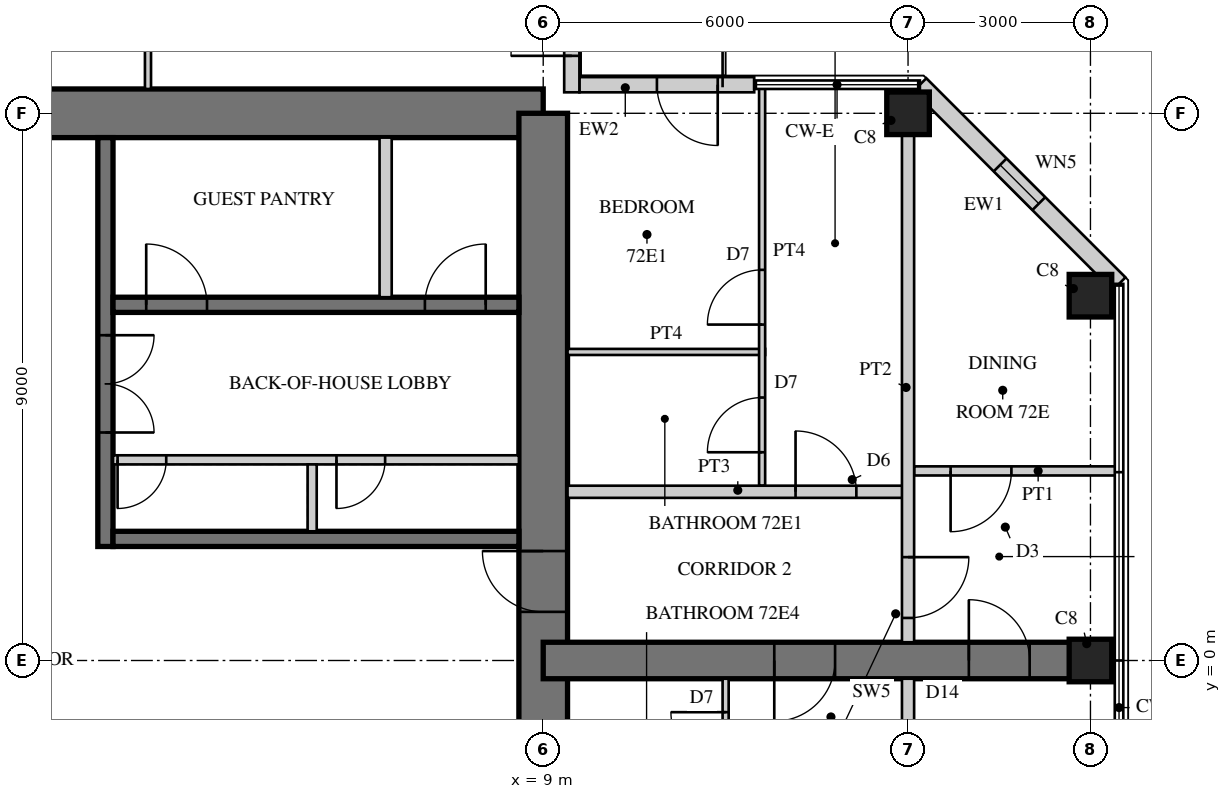
"""IFC4 building model, lengths in metres.
Left out: names, types, materials, properties, quantities, classifications, styles, units other than length and angle.
Written with IfcOpenShell. Run it as: python <this file> out.ifc"""

import sys

from ifc_helpers import new_model, si_unit, direction, frame, frame_2d, origin, origin_2d, place, context, subcontext, project, spatial, rectangle, hollow_rectangle, extrude, element, fill, save


model = new_model("IFC4")
c1 = context("Model", 3, precision=1e-05, world=origin(), true_north=direction((0.0, 1.0)))
c2 = subcontext(c1, "Body", "Model", "MODEL_VIEW")
j1 = project(units=[si_unit("LENGTHUNIT", "METRE"), si_unit("PLANEANGLEUNIT", "RADIAN")], contexts=[c1])
p1 = place(None, origin())
s1 = spatial("IfcSite", under=j1, at=p1, CompositionType="ELEMENT")
p2 = place(p1, origin())
s2 = spatial("IfcBuilding", under=s1, at=p2, CompositionType="ELEMENT")
p3 = place(p2, frame((0.0, 0.0, 278.1)))
s3 = spatial("IfcBuildingStorey", under=s2, at=p3, CompositionType="ELEMENT", Elevation=278.1)
p4 = place(p3, frame((9.0, 9.0, 0.0), z_axis=(0.0, 0.0, 1.0), x_axis=(-1.0, 0.0, 0.0)))
e1 = element("IfcWall", 1, at=p4, inside=s3, PredefinedType="SHEAR", context=c2, shape_type="SweptSolid", body=[
    extrude(rectangle(XDim=18.0, YDim=0.8, at=frame_2d((9.0, 0.0))), origin(), (0.0, 0.0, 1.0), 3.4),
])
p5 = place(p4, frame((9.8, 0.0, 0.0)))
e2 = element("IfcOpeningElement", 2, at=p5, cuts=e1, PredefinedType="OPENING", context=c2, shape_type="SweptSolid", body=[
    extrude(rectangle(XDim=1.0, YDim=2.4, at=frame_2d((0.5, 1.2))), frame((0.0, 0.41, 0.0), z_axis=(0.0, -1.0, 0.0), x_axis=(1.0, 0.0, 0.0)), (0.0, 0.0, 1.0), 0.82),
])
p6 = place(p3, frame((9.0, -9.0, 0.0), z_axis=(0.0, 0.0, 1.0), x_axis=(0.0, 1.0, 0.0)))
e3 = element("IfcWall", 3, at=p6, inside=s3, PredefinedType="SHEAR", context=c2, shape_type="SweptSolid", body=[
    extrude(rectangle(XDim=18.0, YDim=0.8, at=frame_2d((9.0, 0.0))), origin(), (0.0, 0.0, 1.0), 3.4),
])
p7 = place(p6, frame((9.8, 0.0, 0.0)))
e4 = element("IfcOpeningElement", 4, at=p7, cuts=e3, PredefinedType="OPENING", context=c2, shape_type="SweptSolid", body=[
    extrude(rectangle(XDim=1.0, YDim=2.4, at=frame_2d((0.5, 1.2))), frame((0.0, 0.41, 0.0), z_axis=(0.0, -1.0, 0.0), x_axis=(1.0, 0.0, 0.0)), (0.0, 0.0, 1.0), 0.82),
])
p8 = place(p3, frame((1.8, 1.875, 0.0), z_axis=(0.0, 0.0, 1.0), x_axis=(0.0, 1.0, 0.0)))
e5 = element("IfcWall", 5, at=p8, inside=s3, PredefinedType="SHEAR", context=c2, shape_type="SweptSolid", body=[
    extrude(rectangle(XDim=6.725, YDim=0.25, at=frame_2d((3.363, 0.0))), origin(), (0.0, 0.0, 1.0), 3.4),
])
p9 = place(p8, frame((1.875, 0.0, 0.0)))
e6 = element("IfcOpeningElement", 6, at=p9, cuts=e5, PredefinedType="OPENING", context=c2, shape_type="SweptSolid", body=[
    extrude(rectangle(XDim=1.6, YDim=2.4, at=frame_2d((0.8, 1.2))), frame((0.0, 0.135, 0.0), z_axis=(0.0, -1.0, 0.0), x_axis=(1.0, 0.0, 0.0)), (0.0, 0.0, 1.0), 0.27),
])
p10 = place(p3, frame((1.925, 2.0, 0.0), z_axis=(0.0, 0.0, 1.0), x_axis=(1.0, 0.0, 0.0)))
e7 = element("IfcWall", 7, at=p10, inside=s3, PredefinedType="SHEAR", context=c2, shape_type="SweptSolid", body=[
    extrude(rectangle(XDim=6.675, YDim=0.25, at=frame_2d((3.337, 0.0))), origin(), (0.0, 0.0, 1.0), 3.4),
])
p11 = place(p3, frame((1.925, 5.85, 0.0), z_axis=(0.0, 0.0, 1.0), x_axis=(1.0, 0.0, 0.0)))
e8 = element("IfcWall", 8, at=p11, inside=s3, PredefinedType="SHEAR", context=c2, shape_type="SweptSolid", body=[
    extrude(rectangle(XDim=6.675, YDim=0.25, at=frame_2d((3.337, 0.0))), origin(), (0.0, 0.0, 1.0), 3.4),
])
p12 = place(p11, frame((0.546, 0.0, 0.0)))
e9 = element("IfcOpeningElement", 9, at=p12, cuts=e8, PredefinedType="OPENING", context=c2, shape_type="SweptSolid", body=[
    extrude(rectangle(XDim=1.0, YDim=2.1, at=frame_2d((0.5, 1.05))), frame((0.0, 0.135, 0.0), z_axis=(0.0, -1.0, 0.0), x_axis=(1.0, 0.0, 0.0)), (0.0, 0.0, 1.0), 0.27),
])
p13 = place(p11, frame((5.129, 0.0, 0.0)))
e10 = element("IfcOpeningElement", 10, at=p13, cuts=e8, PredefinedType="OPENING", context=c2, shape_type="SweptSolid", body=[
    extrude(rectangle(XDim=1.0, YDim=2.1, at=frame_2d((0.5, 1.05))), frame((0.0, 0.135, 0.0), z_axis=(0.0, -1.0, 0.0), x_axis=(1.0, 0.0, 0.0)), (0.0, 0.0, 1.0), 0.27),
])
p14 = place(p3, frame((1.925, 3.3, 0.0), z_axis=(0.0, 0.0, 1.0), x_axis=(1.0, 0.0, 0.0)))
e11 = element("IfcWall", 11, at=p14, inside=s3, PredefinedType="PARTITIONING", context=c2, shape_type="SweptSolid", body=[
    extrude(rectangle(XDim=6.675, YDim=0.15, at=frame_2d((3.337, 0.0))), origin(), (0.0, 0.0, 1.0), 3.4),
])
p15 = place(p14, frame((0.075, 0.0, 0.0)))
e12 = element("IfcOpeningElement", 12, at=p15, cuts=e11, PredefinedType="OPENING", context=c2, shape_type="SweptSolid", body=[
    extrude(rectangle(XDim=0.8, YDim=2.1, at=frame_2d((0.4, 1.05))), frame((0.0, 0.085, 0.0), z_axis=(0.0, -1.0, 0.0), x_axis=(1.0, 0.0, 0.0)), (0.0, 0.0, 1.0), 0.17),
])
p16 = place(p14, frame((3.675, 0.0, 0.0)))
e13 = element("IfcOpeningElement", 13, at=p16, cuts=e11, PredefinedType="OPENING", context=c2, shape_type="SweptSolid", body=[
    extrude(rectangle(XDim=0.8, YDim=2.1, at=frame_2d((0.4, 1.05))), frame((0.0, 0.085, 0.0), z_axis=(0.0, -1.0, 0.0), x_axis=(1.0, 0.0, 0.0)), (0.0, 0.0, 1.0), 0.17),
])
p17 = place(p3, frame((5.2, 2.125, 0.0), z_axis=(0.0, 0.0, 1.0), x_axis=(0.0, 1.0, 0.0)))
e14 = element("IfcWall", 14, at=p17, inside=s3, PredefinedType="PARTITIONING", context=c2, shape_type="SweptSolid", body=[
    extrude(rectangle(XDim=1.1, YDim=0.15, at=frame_2d((0.55, 0.0))), origin(), (0.0, 0.0, 1.0), 3.4),
])
p18 = place(p3, frame((6.408, 5.975, 0.0), z_axis=(0.0, 0.0, 1.0), x_axis=(0.0, 1.0, 0.0)))
e15 = element("IfcWall", 15, at=p18, inside=s3, PredefinedType="PARTITIONING", context=c2, shape_type="SweptSolid", body=[
    extrude(rectangle(XDim=2.625, YDim=0.2, at=frame_2d((1.312, 0.0))), origin(), (0.0, 0.0, 1.0), 3.4),
])
p19 = place(p3, frame((9.0, 0.0, 0.0), z_axis=(0.0, 0.0, 1.0), x_axis=(1.0, 0.0, 0.0)))
e16 = element("IfcWall", 16, at=p19, inside=s3, PredefinedType="SHEAR", context=c2, shape_type="SweptSolid", body=[
    extrude(rectangle(XDim=9.0, YDim=0.6, at=frame_2d((4.5, 0.0))), origin(), (0.0, 0.0, 1.0), 3.4),
])
p20 = place(p19, frame((3.8, 0.0, 0.0)))
e17 = element("IfcOpeningElement", 17, at=p20, cuts=e16, PredefinedType="OPENING", context=c2, shape_type="SweptSolid", body=[
    extrude(rectangle(XDim=1.0, YDim=2.15, at=frame_2d((0.5, 1.075))), frame((0.0, 0.31, 0.0), z_axis=(0.0, -1.0, 0.0), x_axis=(1.0, 0.0, 0.0)), (0.0, 0.0, 1.0), 0.62),
])
p21 = place(p19, frame((7.0, 0.0, 0.0)))
e18 = element("IfcOpeningElement", 18, at=p21, cuts=e16, PredefinedType="OPENING", context=c2, shape_type="SweptSolid", body=[
    extrude(rectangle(XDim=1.0, YDim=2.2, at=frame_2d((0.5, 1.1))), frame((0.0, 0.31, 0.0), z_axis=(0.0, -1.0, 0.0), x_axis=(1.0, 0.0, 0.0)), (0.0, 0.0, 1.0), 0.62),
])
for number, where, z_axis, x_axis in (
    (19, (15.0, 9.0, 0.0), (0.0, 0.0, 1.0), (1.0, 0.0, 0.0)),
    (20, (18.0, 0.0, 0.0), (0.0, 0.0, 1.0), (1.0, 0.0, 0.0)),
    (21, (18.0, 6.0, 0.0), (0.0, 0.0, 1.0), (1.0, 0.0, 0.0)),
):
    element("IfcColumn", number, at=place(p3, frame(where, z_axis=z_axis, x_axis=x_axis)), inside=s3, PredefinedType="COLUMN", context=c2, shape_type="SweptSolid", body=[
        extrude(rectangle(XDim=0.7, YDim=0.7, at=origin_2d()), origin(), (0.0, 0.0, 1.0), 3.4),
    ])
p22 = place(p3, frame((18.47, 6.195, 0.0), z_axis=(0.0, 0.0, 1.0), x_axis=(-0.707106781187, 0.707106781187, 0.0)))
e22 = element("IfcWall", 22, at=p22, inside=s3, PredefinedType="SOLIDWALL", context=c2, shape_type="SweptSolid", body=[
    extrude(rectangle(XDim=4.632, YDim=0.3, at=frame_2d((2.316, 0.0))), origin(), (0.0, 0.0, 1.0), 3.22),
])
p23 = place(p22, frame((1.866, 0.0, 0.3)))
e23 = element("IfcOpeningElement", 23, at=p23, cuts=e22, PredefinedType="OPENING", context=c2, shape_type="SweptSolid", body=[
    extrude(rectangle(XDim=0.9, YDim=2.4, at=frame_2d((0.45, 1.2))), frame((0.0, 0.16, 0.0), z_axis=(0.0, -1.0, 0.0), x_axis=(1.0, 0.0, 0.0)), (0.0, 0.0, 1.0), 0.32),
])
p24 = place(p3, frame((12.47, 9.47, 0.0), z_axis=(0.0, 0.0, 1.0), x_axis=(-1.0, 0.0, 0.0)))
e24 = element("IfcWall", 24, at=p24, inside=s3, PredefinedType="SOLIDWALL", context=c2, shape_type="SweptSolid", body=[
    extrude(rectangle(XDim=2.875, YDim=0.25, at=frame_2d((1.438, 0.0))), origin(), (0.0, 0.0, 1.0), 3.22),
])
p25 = place(p24, frame((0.6, 0.0, 0.0)))
e25 = element("IfcOpeningElement", 25, at=p25, cuts=e24, PredefinedType="OPENING", context=c2, shape_type="SweptSolid", body=[
    extrude(rectangle(XDim=1.0, YDim=2.2, at=frame_2d((0.5, 1.1))), frame((0.0, 0.135, 0.0), z_axis=(0.0, -1.0, 0.0), x_axis=(1.0, 0.0, 0.0)), (0.0, 0.0, 1.0), 0.27),
])
p26 = place(p3, frame((9.47, 9.345, 0.0), z_axis=(0.0, 0.0, 1.0), x_axis=(0.0, 1.0, 0.0)))
e26 = element("IfcWall", 26, at=p26, inside=s3, PredefinedType="SOLIDWALL", context=c2, shape_type="SweptSolid", body=[
    extrude(rectangle(XDim=3.125, YDim=0.25, at=frame_2d((1.562, 0.0))), origin(), (0.0, 0.0, 1.0), 3.22),
])
p27 = place(p26, frame((0.6, 0.0, 0.0)))
e27 = element("IfcOpeningElement", 27, at=p27, cuts=e26, PredefinedType="OPENING", context=c2, shape_type="SweptSolid", body=[
    extrude(rectangle(XDim=1.0, YDim=2.2, at=frame_2d((0.5, 1.1))), frame((0.0, 0.135, 0.0), z_axis=(0.0, -1.0, 0.0), x_axis=(1.0, 0.0, 0.0)), (0.0, 0.0, 1.0), 0.27),
])
p28 = place(p3, frame((2.5, 9.4, 0.0), z_axis=(0.0, 0.0, 1.0), x_axis=(0.0, 1.0, 0.0)))
e28 = element("IfcWall", 28, at=p28, inside=s3, PredefinedType="PARTITIONING", context=c2, shape_type="SweptSolid", body=[
    extrude(rectangle(XDim=2.65, YDim=0.1, at=frame_2d((1.325, 0.0))), origin(), (0.0, 0.0, 1.0), 3.22),
])
p29 = place(p3, frame((9.4, 5.075, 0.0), z_axis=(0.0, 0.0, 1.0), x_axis=(1.0, 0.0, 0.0)))
e29 = element("IfcWall", 29, at=p29, inside=s3, PredefinedType="PARTITIONING", context=c2, shape_type="SweptSolid", body=[
    extrude(rectangle(XDim=3.25, YDim=0.1, at=frame_2d((1.625, 0.0))), origin(), (0.0, 0.0, 1.0), 3.22),
])
p30 = place(p3, frame((12.6, 2.875, 0.0), z_axis=(0.0, 0.0, 1.0), x_axis=(0.0, 1.0, 0.0)))
e30 = element("IfcWall", 30, at=p30, inside=s3, PredefinedType="PARTITIONING", context=c2, shape_type="SweptSolid", body=[
    extrude(rectangle(XDim=6.555, YDim=0.1, at=frame_2d((3.277, 0.0))), origin(), (0.0, 0.0, 1.0), 3.22),
])
p31 = place(p30, frame((0.55, 0.0, 0.0)))
e31 = element("IfcOpeningElement", 31, at=p31, cuts=e30, PredefinedType="OPENING", context=c2, shape_type="SweptSolid", body=[
    extrude(rectangle(XDim=0.9, YDim=2.1, at=frame_2d((0.45, 1.05))), frame((0.0, 0.06, 0.0), z_axis=(0.0, -1.0, 0.0), x_axis=(1.0, 0.0, 0.0)), (0.0, 0.0, 1.0), 0.12),
])
p32 = place(p30, frame((2.65, 0.0, 0.0)))
e32 = element("IfcOpeningElement", 32, at=p32, cuts=e30, PredefinedType="OPENING", context=c2, shape_type="SweptSolid", body=[
    extrude(rectangle(XDim=0.9, YDim=2.1, at=frame_2d((0.45, 1.05))), frame((0.0, 0.06, 0.0), z_axis=(0.0, -1.0, 0.0), x_axis=(1.0, 0.0, 0.0)), (0.0, 0.0, 1.0), 0.12),
])
p33 = place(p3, frame((12.0, -9.345, 0.0), z_axis=(0.0, 0.0, 1.0), x_axis=(0.0, 1.0, 0.0)))
e33 = element("IfcWall", 33, at=p33, inside=s3, PredefinedType="PARTITIONING", context=c2, shape_type="SweptSolid", body=[
    extrude(rectangle(XDim=9.045, YDim=0.1, at=frame_2d((4.522, 0.0))), origin(), (0.0, 0.0, 1.0), 3.22),
])
p34 = place(p33, frame((5.495, 0.0, 0.0)))
e34 = element("IfcOpeningElement", 34, at=p34, cuts=e33, PredefinedType="OPENING", context=c2, shape_type="SweptSolid", body=[
    extrude(rectangle(XDim=0.9, YDim=2.1, at=frame_2d((0.45, 1.05))), frame((0.0, 0.06, 0.0), z_axis=(0.0, -1.0, 0.0), x_axis=(1.0, 0.0, 0.0)), (0.0, 0.0, 1.0), 0.12),
])
p35 = place(p33, frame((7.595, 0.0, 0.0)))
e35 = element("IfcOpeningElement", 35, at=p35, cuts=e33, PredefinedType="OPENING", context=c2, shape_type="SweptSolid", body=[
    extrude(rectangle(XDim=0.9, YDim=2.1, at=frame_2d((0.45, 1.05))), frame((0.0, 0.06, 0.0), z_axis=(0.0, -1.0, 0.0), x_axis=(1.0, 0.0, 0.0)), (0.0, 0.0, 1.0), 0.12),
])
p36 = place(p3, frame((9.4, 2.775, 0.0), z_axis=(0.0, 0.0, 1.0), x_axis=(1.0, 0.0, 0.0)))
e36 = element("IfcWall", 36, at=p36, inside=s3, PredefinedType="SOLIDWALL", context=c2, shape_type="SweptSolid", body=[
    extrude(rectangle(XDim=5.6, YDim=0.2, at=frame_2d((2.8, 0.0))), origin(), (0.0, 0.0, 1.0), 3.22),
])
p37 = place(p36, frame((3.75, 0.0, 0.0)))
e37 = element("IfcOpeningElement", 37, at=p37, cuts=e36, PredefinedType="OPENING", context=c2, shape_type="SweptSolid", body=[
    extrude(rectangle(XDim=1.0, YDim=2.15, at=frame_2d((0.5, 1.075))), frame((0.0, 0.11, 0.0), z_axis=(0.0, -1.0, 0.0), x_axis=(1.0, 0.0, 0.0)), (0.0, 0.0, 1.0), 0.22),
])
p38 = place(p3, frame((15.1, 3.118, 0.0), z_axis=(0.0, 0.0, 1.0), x_axis=(1.0, 0.0, 0.0)))
e38 = element("IfcWall", 38, at=p38, inside=s3, PredefinedType="PARTITIONING", context=c2, shape_type="SweptSolid", body=[
    extrude(rectangle(XDim=3.33, YDim=0.15, at=frame_2d((1.665, 0.0))), origin(), (0.0, 0.0, 1.0), 3.22),
])
p39 = place(p38, frame((0.6, 0.0, 0.0)))
e39 = element("IfcOpeningElement", 39, at=p39, cuts=e38, PredefinedType="OPENING", context=c2, shape_type="SweptSolid", body=[
    extrude(rectangle(XDim=1.0, YDim=2.1, at=frame_2d((0.5, 1.05))), frame((0.0, 0.085, 0.0), z_axis=(0.0, -1.0, 0.0), x_axis=(1.0, 0.0, 0.0)), (0.0, 0.0, 1.0), 0.17),
])
p40 = place(p3, frame((15.0, -8.65, 0.0), z_axis=(0.0, 0.0, 1.0), x_axis=(0.0, 1.0, 0.0)))
e40 = element("IfcWall", 40, at=p40, inside=s3, PredefinedType="SOLIDWALL", context=c2, shape_type="SweptSolid", body=[
    extrude(rectangle(XDim=8.35, YDim=0.2, at=frame_2d((4.175, 0.0))), origin(), (0.0, 0.0, 1.0), 2.52),
])
p41 = place(p3, frame((15.0, 0.3, 0.0), z_axis=(0.0, 0.0, 1.0), x_axis=(0.0, 1.0, 0.0)))
e41 = element("IfcWall", 41, at=p41, inside=s3, PredefinedType="SOLIDWALL", context=c2, shape_type="SweptSolid", body=[
    extrude(rectangle(XDim=8.35, YDim=0.2, at=frame_2d((4.175, 0.0))), origin(), (0.0, 0.0, 1.0), 2.52),
])
p42 = place(p41, frame((0.4, 0.0, 0.0)))
e42 = element("IfcOpeningElement", 42, at=p42, cuts=e41, PredefinedType="OPENING", context=c2, shape_type="SweptSolid", body=[
    extrude(rectangle(XDim=1.0, YDim=2.2, at=frame_2d((0.5, 1.1))), frame((0.0, 0.11, 0.0), z_axis=(0.0, -1.0, 0.0), x_axis=(1.0, 0.0, 0.0)), (0.0, 0.0, 1.0), 0.22),
])
p43 = place(p23, origin())
e43 = element("IfcWindow", 43, at=p43, inside=s3, PartitioningType="SINGLE_PANEL", PredefinedType="WINDOW", context=c2, shape_type="SweptSolid", body=[
    extrude(hollow_rectangle(XDim=0.9, YDim=2.4, WallThickness=0.06, at=frame_2d((0.45, 1.2))), frame((0.0, 0.03, 0.0), z_axis=(0.0, -1.0, 0.0), x_axis=(1.0, 0.0, 0.0)), (0.0, 0.0, 1.0), 0.06),
    extrude(rectangle(XDim=0.779, YDim=2.279, at=frame_2d((0.45, 1.2))), frame((0.0, 0.03, 0.0), z_axis=(0.0, -1.0, 0.0), x_axis=(1.0, 0.0, 0.0)), (0.0, 0.0, 1.0), 0.06),
])
fill(e23, e43)
p44 = place(p25, origin())
e44 = element("IfcDoor", 44, at=p44, inside=s3, OperationType="SINGLE_SWING_LEFT", PredefinedType="DOOR", context=c2, shape_type="SweptSolid", body=[
    extrude(hollow_rectangle(XDim=1.0, YDim=2.2, WallThickness=0.06, at=frame_2d((0.5, 1.1))), frame((0.0, 0.025, 0.0), z_axis=(0.0, -1.0, 0.0), x_axis=(1.0, 0.0, 0.0)), (0.0, 0.0, 1.0), 0.05),
    extrude(rectangle(XDim=0.879, YDim=2.079, at=frame_2d((0.5, 1.1))), frame((0.0, 0.025, 0.0), z_axis=(0.0, -1.0, 0.0), x_axis=(1.0, 0.0, 0.0)), (0.0, 0.0, 1.0), 0.05),
])
fill(e25, e44)
p45 = place(p27, origin())
e45 = element("IfcDoor", 45, at=p45, inside=s3, OperationType="SINGLE_SWING_LEFT", PredefinedType="DOOR", context=c2, shape_type="SweptSolid", body=[
    extrude(hollow_rectangle(XDim=1.0, YDim=2.2, WallThickness=0.06, at=frame_2d((0.5, 1.1))), frame((0.0, 0.025, 0.0), z_axis=(0.0, -1.0, 0.0), x_axis=(1.0, 0.0, 0.0)), (0.0, 0.0, 1.0), 0.05),
    extrude(rectangle(XDim=0.879, YDim=2.079, at=frame_2d((0.5, 1.1))), frame((0.0, 0.025, 0.0), z_axis=(0.0, -1.0, 0.0), x_axis=(1.0, 0.0, 0.0)), (0.0, 0.0, 1.0), 0.05),
])
fill(e27, e45)
p46 = place(p31, origin())
e46 = element("IfcDoor", 46, at=p46, inside=s3, OperationType="SINGLE_SWING_LEFT", PredefinedType="DOOR", context=c2, shape_type="SweptSolid", body=[
    extrude(rectangle(XDim=0.9, YDim=2.1, at=frame_2d((0.45, 1.05))), frame((0.0, 0.025, 0.0), z_axis=(0.0, -1.0, 0.0), x_axis=(1.0, 0.0, 0.0)), (0.0, 0.0, 1.0), 0.05),
])
fill(e31, e46)
p47 = place(p32, origin())
e47 = element("IfcDoor", 47, at=p47, inside=s3, OperationType="SINGLE_SWING_LEFT", PredefinedType="DOOR", context=c2, shape_type="SweptSolid", body=[
    extrude(rectangle(XDim=0.9, YDim=2.1, at=frame_2d((0.45, 1.05))), frame((0.0, 0.025, 0.0), z_axis=(0.0, -1.0, 0.0), x_axis=(1.0, 0.0, 0.0)), (0.0, 0.0, 1.0), 0.05),
])
fill(e32, e47)
p48 = place(p35, origin())
e48 = element("IfcDoor", 48, at=p48, inside=s3, OperationType="SINGLE_SWING_RIGHT", PredefinedType="DOOR", context=c2, shape_type="SweptSolid", body=[
    extrude(rectangle(XDim=0.9, YDim=2.1, at=frame_2d((0.45, 1.05))), frame((0.0, 0.025, 0.0), z_axis=(0.0, -1.0, 0.0), x_axis=(1.0, 0.0, 0.0)), (0.0, 0.0, 1.0), 0.05),
])
fill(e35, e48)
p49 = place(p37, origin())
e49 = element("IfcDoor", 49, at=p49, inside=s3, OperationType="SINGLE_SWING_LEFT", PredefinedType="DOOR", context=c2, shape_type="SweptSolid", body=[
    extrude(rectangle(XDim=1.0, YDim=2.15, at=frame_2d((0.5, 1.075))), frame((0.0, 0.025, 0.0), z_axis=(0.0, -1.0, 0.0), x_axis=(1.0, 0.0, 0.0)), (0.0, 0.0, 1.0), 0.05),
])
fill(e37, e49)
p50 = place(p39, frame((1.0, 0.0, 0.0), z_axis=(0.0, 0.0, 1.0), x_axis=(-1.0, 0.0, 0.0)))
e50 = element("IfcDoor", 50, at=p50, inside=s3, OperationType="SINGLE_SWING_RIGHT", PredefinedType="DOOR", context=c2, shape_type="SweptSolid", body=[
    extrude(rectangle(XDim=1.0, YDim=2.1, at=frame_2d((0.5, 1.05))), frame((0.0, 0.025, 0.0), z_axis=(0.0, -1.0, 0.0), x_axis=(1.0, 0.0, 0.0)), (0.0, 0.0, 1.0), 0.05),
])
fill(e39, e50)
p51 = place(p42, frame((1.0, 0.0, 0.0), z_axis=(0.0, 0.0, 1.0), x_axis=(-1.0, 0.0, 0.0)))
e51 = element("IfcDoor", 51, at=p51, inside=s3, OperationType="SINGLE_SWING_LEFT", PredefinedType="DOOR", context=c2, shape_type="SweptSolid", body=[
    extrude(rectangle(XDim=1.0, YDim=2.2, at=frame_2d((0.5, 1.1))), frame((0.0, 0.025, 0.0), z_axis=(0.0, -1.0, 0.0), x_axis=(1.0, 0.0, 0.0)), (0.0, 0.0, 1.0), 0.05),
])
fill(e42, e51)
p52 = place(p20, frame((1.0, 0.0, 0.0), z_axis=(0.0, 0.0, 1.0), x_axis=(-1.0, 0.0, 0.0)))
e52 = element("IfcDoor", 52, at=p52, inside=s3, OperationType="SINGLE_SWING_RIGHT", PredefinedType="DOOR", context=c2, shape_type="SweptSolid", body=[
    extrude(rectangle(XDim=1.0, YDim=2.15, at=frame_2d((0.5, 1.075))), frame((0.0, 0.025, 0.0), z_axis=(0.0, -1.0, 0.0), x_axis=(1.0, 0.0, 0.0)), (0.0, 0.0, 1.0), 0.05),
])
fill(e17, e52)
p53 = place(p21, origin())
e53 = element("IfcDoor", 53, at=p53, inside=s3, OperationType="SINGLE_SWING_LEFT", PredefinedType="DOOR", context=c2, shape_type="SweptSolid", body=[
    extrude(rectangle(XDim=1.0, YDim=2.2, at=frame_2d((0.5, 1.1))), frame((0.0, 0.025, 0.0), z_axis=(0.0, -1.0, 0.0), x_axis=(1.0, 0.0, 0.0)), (0.0, 0.0, 1.0), 0.05),
])
fill(e18, e53)
p54 = place(p7, origin())
e54 = element("IfcDoor", 54, at=p54, inside=s3, OperationType="SINGLE_SWING_RIGHT", PredefinedType="DOOR", context=c2, shape_type="SweptSolid", body=[
    extrude(rectangle(XDim=1.0, YDim=2.4, at=frame_2d((0.5, 1.2))), frame((0.0, 0.055, 0.0), z_axis=(0.0, -1.0, 0.0), x_axis=(1.0, 0.0, 0.0)), (0.0, 0.0, 1.0), 0.05),
])
fill(e4, e54)
p55 = place(p9, frame((1.6, 0.0, 0.0), z_axis=(0.0, 0.0, 1.0), x_axis=(-1.0, 0.0, 0.0)))
e55 = element("IfcDoor", 55, at=p55, inside=s3, OperationType="DOUBLE_DOOR_SINGLE_SWING", PredefinedType="DOOR", context=c2, shape_type="SweptSolid", body=[
    extrude(rectangle(XDim=1.6, YDim=2.4, at=frame_2d((0.8, 1.2))), frame((0.0, 0.025, 0.0), z_axis=(0.0, -1.0, 0.0), x_axis=(1.0, 0.0, 0.0)), (0.0, 0.0, 1.0), 0.05),
])
fill(e6, e55)
p56 = place(p15, frame((0.8, 0.0, 0.0), z_axis=(0.0, 0.0, 1.0), x_axis=(-1.0, 0.0, 0.0)))
e56 = element("IfcDoor", 56, at=p56, inside=s3, OperationType="SINGLE_SWING_RIGHT", PredefinedType="DOOR", context=c2, shape_type="SweptSolid", body=[
    extrude(rectangle(XDim=0.8, YDim=2.1, at=frame_2d((0.4, 1.05))), frame((0.0, 0.025, 0.0), z_axis=(0.0, -1.0, 0.0), x_axis=(1.0, 0.0, 0.0)), (0.0, 0.0, 1.0), 0.05),
])
fill(e12, e56)
p57 = place(p16, frame((0.8, 0.0, 0.0), z_axis=(0.0, 0.0, 1.0), x_axis=(-1.0, 0.0, 0.0)))
e57 = element("IfcDoor", 57, at=p57, inside=s3, OperationType="SINGLE_SWING_RIGHT", PredefinedType="DOOR", context=c2, shape_type="SweptSolid", body=[
    extrude(rectangle(XDim=0.8, YDim=2.1, at=frame_2d((0.4, 1.05))), frame((0.0, 0.025, 0.0), z_axis=(0.0, -1.0, 0.0), x_axis=(1.0, 0.0, 0.0)), (0.0, 0.0, 1.0), 0.05),
])
fill(e13, e57)
p58 = place(p12, origin())
e58 = element("IfcDoor", 58, at=p58, inside=s3, OperationType="SINGLE_SWING_LEFT", PredefinedType="DOOR", context=c2, shape_type="SweptSolid", body=[
    extrude(rectangle(XDim=1.0, YDim=2.1, at=frame_2d((0.5, 1.05))), frame((0.0, 0.025, 0.0), z_axis=(0.0, -1.0, 0.0), x_axis=(1.0, 0.0, 0.0)), (0.0, 0.0, 1.0), 0.05),
])
fill(e9, e58)
p59 = place(p13, origin())
e59 = element("IfcDoor", 59, at=p59, inside=s3, OperationType="SINGLE_SWING_RIGHT", PredefinedType="DOOR", context=c2, shape_type="SweptSolid", body=[
    extrude(rectangle(XDim=1.0, YDim=2.1, at=frame_2d((0.5, 1.05))), frame((0.0, 0.025, 0.0), z_axis=(0.0, -1.0, 0.0), x_axis=(1.0, 0.0, 0.0)), (0.0, 0.0, 1.0), 0.05),
])
fill(e10, e59)
save(model, sys.argv[1])
